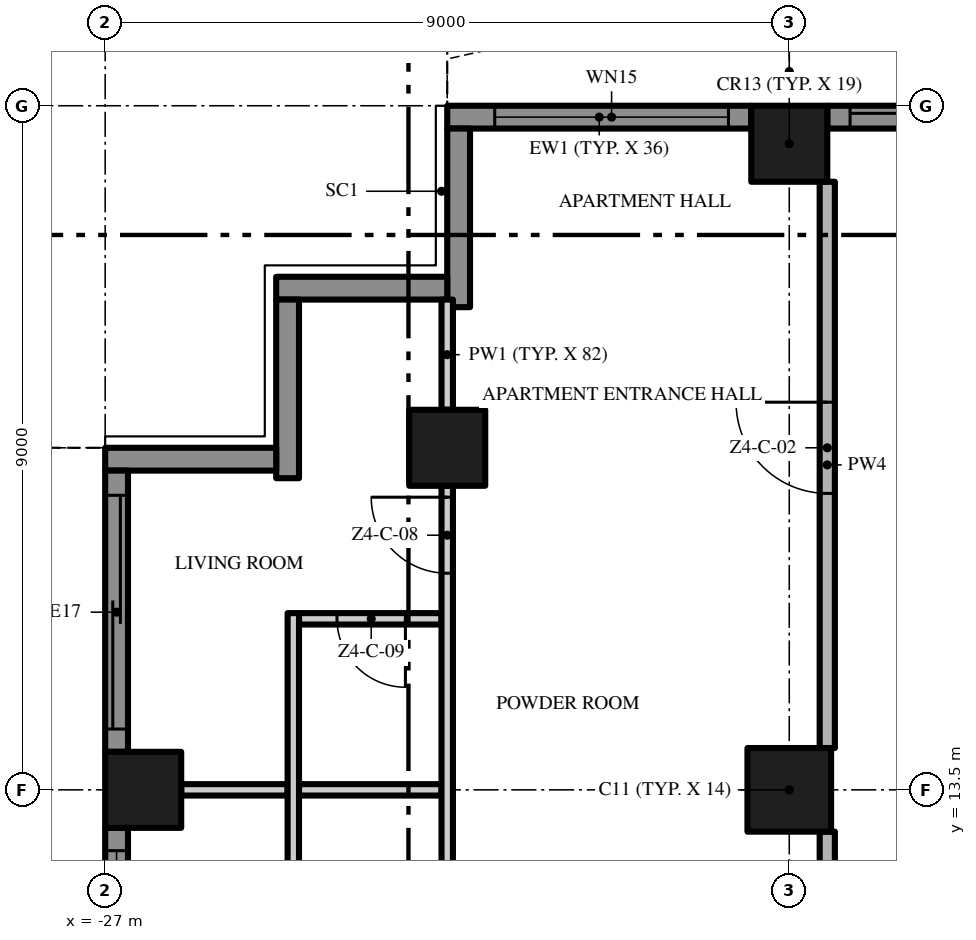
"""IFC4 building model, lengths in metres.
Left out: names, types, materials, properties, quantities, classifications, styles, units other than length and angle.
Written with IfcOpenShell. Run it as: python <this file> out.ifc"""

import sys

from ifc_helpers import new_model, si_unit, direction, frame, frame_2d, origin, origin_2d, place, context, subcontext, project, spatial, polyline, rectangle, outline, extrude, element, fill, save


model = new_model("IFC4")
c1 = context("Model", 3, precision=1e-05, world=origin(), true_north=direction((0.0, 1.0)))
c2 = subcontext(c1, "Body", "Model", "MODEL_VIEW")
j1 = project(units=[si_unit("LENGTHUNIT", "METRE"), si_unit("PLANEANGLEUNIT", "RADIAN")], contexts=[c1])
p1 = place(None, origin())
s1 = spatial("IfcSite", under=j1, at=p1, CompositionType="ELEMENT")
p2 = place(p1, origin())
s2 = spatial("IfcBuilding", under=s1, at=p2, CompositionType="ELEMENT")
p3 = place(p2, frame((0.0, 0.0, 214.8)))
s3 = spatial("IfcBuildingStorey", under=s2, at=p3, CompositionType="ELEMENT", Elevation=214.8)
p4 = place(p3, frame((-18.0, 13.5, 0.0), z_axis=(0.0, 0.0, 1.0), x_axis=(1.0, 0.0, 0.0)))
e1 = element("IfcColumn", 1, at=p4, inside=s3, PredefinedType="COLUMN", context=c2, shape_type="SweptSolid", body=[
    extrude(rectangle(XDim=1.1, YDim=1.1, at=origin_2d()), origin(), (0.0, 0.0, 1.0), 3.5),
])
for number, where, z_axis, x_axis in (
    (2, (-18.0, 22.0, 0.0), (0.0, 0.0, 1.0), (1.0, 0.0, 0.0)),
    (3, (-26.5, 13.5, 0.0), (0.0, 0.0, 1.0), (1.0, 0.0, 0.0)),
    (4, (-22.5, 18.0, 0.0), (0.0, 0.0, 1.0), (1.0, 0.0, 0.0)),
):
    element("IfcColumn", number, at=place(p3, frame(where, z_axis=z_axis, x_axis=x_axis)), inside=s3, PredefinedType="COLUMN", context=c2, shape_type="SweptSolid", body=[
        extrude(rectangle(XDim=1.0, YDim=1.0, at=origin_2d()), origin(), (0.0, 0.0, 1.0), 3.5),
    ])
p5 = place(p3, frame((-17.5, 22.35, 0.0), z_axis=(0.0, 0.0, 1.0), x_axis=(1.0, 0.0, 0.0)))
e5 = element("IfcWall", 5, at=p5, inside=s3, PredefinedType="SOLIDWALL", context=c2, shape_type="SweptSolid", body=[
    extrude(rectangle(XDim=4.0, YDim=0.3, at=frame_2d((2.0, 0.0))), origin(), (0.0, 0.0, 1.0), 3.5),
])
p6 = place(p5, frame((0.3, 0.0, 0.0)))
e6 = element("IfcOpeningElement", 6, at=p6, cuts=e5, PredefinedType="OPENING", context=c2, shape_type="SweptSolid", body=[
    extrude(rectangle(XDim=3.075, YDim=2.4, at=frame_2d((1.538, 1.2))), frame((0.0, 0.16, 0.0), z_axis=(0.0, -1.0, 0.0), x_axis=(1.0, 0.0, 0.0)), (0.0, 0.0, 1.0), 0.32),
])
p7 = place(p3, frame((-22.5, 22.35, 0.0), z_axis=(0.0, 0.0, 1.0), x_axis=(1.0, 0.0, 0.0)))
e7 = element("IfcWall", 7, at=p7, inside=s3, PredefinedType="SOLIDWALL", context=c2, shape_type="SweptSolid", body=[
    extrude(rectangle(XDim=4.0, YDim=0.3, at=frame_2d((2.0, 0.0))), origin(), (0.0, 0.0, 1.0), 3.5),
])
p8 = place(p7, frame((0.625, 0.0, 0.45)))
e8 = element("IfcOpeningElement", 8, at=p8, cuts=e7, PredefinedType="OPENING", context=c2, shape_type="SweptSolid", body=[
    extrude(rectangle(XDim=3.075, YDim=2.65, at=frame_2d((1.538, 1.325))), frame((0.0, 0.16, 0.0), z_axis=(0.0, -1.0, 0.0), x_axis=(1.0, 0.0, 0.0)), (0.0, 0.0, 1.0), 0.32),
])
p9 = place(p3, frame((-22.35, 19.85, 0.0), z_axis=(0.0, 0.0, 1.0), x_axis=(0.0, 1.0, 0.0)))
e9 = element("IfcWall", 9, at=p9, inside=s3, PredefinedType="SOLIDWALL", context=c2, shape_type="SweptSolid", body=[
    extrude(rectangle(XDim=2.35, YDim=0.3, at=frame_2d((1.175, 0.0))), origin(), (0.0, 0.0, 1.0), 3.5),
])
p10 = place(p3, frame((-24.75, 20.1, 0.0), z_axis=(0.0, 0.0, 1.0), x_axis=(1.0, 0.0, 0.0)))
e10 = element("IfcWall", 10, at=p10, inside=s3, PredefinedType="SOLIDWALL", context=c2, shape_type="SweptSolid", body=[
    extrude(rectangle(XDim=2.25, YDim=0.3, at=frame_2d((1.125, 0.0))), origin(), (0.0, 0.0, 1.0), 3.5),
])
p11 = place(p3, frame((-24.6, 17.6, 0.0), z_axis=(0.0, 0.0, 1.0), x_axis=(0.0, 1.0, 0.0)))
e11 = element("IfcWall", 11, at=p11, inside=s3, PredefinedType="SOLIDWALL", context=c2, shape_type="SweptSolid", body=[
    extrude(rectangle(XDim=2.35, YDim=0.3, at=frame_2d((1.175, 0.0))), origin(), (0.0, 0.0, 1.0), 3.5),
])
p12 = place(p3, frame((-27.0, 17.85, 0.0), z_axis=(0.0, 0.0, 1.0), x_axis=(1.0, 0.0, 0.0)))
e12 = element("IfcWall", 12, at=p12, inside=s3, PredefinedType="SOLIDWALL", context=c2, shape_type="SweptSolid", body=[
    extrude(rectangle(XDim=2.25, YDim=0.3, at=frame_2d((1.125, 0.0))), origin(), (0.0, 0.0, 1.0), 3.5),
])
p13 = place(p3, frame((-26.85, 14.0, 0.0), z_axis=(0.0, 0.0, 1.0), x_axis=(0.0, 1.0, 0.0)))
e13 = element("IfcWall", 13, at=p13, inside=s3, PredefinedType="SOLIDWALL", context=c2, shape_type="SweptSolid", body=[
    extrude(rectangle(XDim=3.7, YDim=0.3, at=frame_2d((1.85, 0.0))), origin(), (0.0, 0.0, 1.0), 3.5),
])
p14 = place(p13, frame((0.3, 0.0, 0.0)))
e14 = element("IfcOpeningElement", 14, at=p14, cuts=e13, PredefinedType="OPENING", context=c2, shape_type="SweptSolid", body=[
    extrude(rectangle(XDim=3.075, YDim=2.4, at=frame_2d((1.538, 1.2))), frame((0.0, 0.16, 0.0), z_axis=(0.0, -1.0, 0.0), x_axis=(1.0, 0.0, 0.0)), (0.0, 0.0, 1.0), 0.32),
])
p15 = place(p3, frame((-26.85, 5.0, 0.0), z_axis=(0.0, 0.0, 1.0), x_axis=(0.0, 1.0, 0.0)))
e15 = element("IfcWall", 15, at=p15, inside=s3, PredefinedType="SOLIDWALL", context=c2, shape_type="SweptSolid", body=[
    extrude(rectangle(XDim=8.0, YDim=0.3, at=frame_2d((4.0, 0.0))), origin(), (0.0, 0.0, 1.0), 3.5),
])
p16 = place(p15, frame((4.625, 0.0, 0.45)))
e16 = element("IfcOpeningElement", 16, at=p16, cuts=e15, PredefinedType="OPENING", context=c2, shape_type="SweptSolid", body=[
    extrude(rectangle(XDim=3.075, YDim=2.65, at=frame_2d((1.538, 1.325))), frame((0.0, 0.16, 0.0), z_axis=(0.0, -1.0, 0.0), x_axis=(1.0, 0.0, 0.0)), (0.0, 0.0, 1.0), 0.32),
])
p17 = place(p15, frame((0.3, 0.0, 0.45)))
e17 = element("IfcOpeningElement", 17, at=p17, cuts=e15, PredefinedType="OPENING", context=c2, shape_type="SweptSolid", body=[
    extrude(rectangle(XDim=3.075, YDim=2.65, at=frame_2d((1.538, 1.325))), frame((0.0, 0.16, 0.0), z_axis=(0.0, -1.0, 0.0), x_axis=(1.0, 0.0, 0.0)), (0.0, 0.0, 1.0), 0.32),
])
p18 = place(p3, origin())
e18 = element("IfcWall", 18, at=p18, inside=s3, PredefinedType="USERDEFINED", context=c2, shape_type="SweptSolid", body=[
    extrude(outline(polyline([(-13.5, 25.149), (-15.0, 25.485), (-15.375, 25.5), (-16.5, 25.369), (-18.0, 24.845), (-19.5, 24.112), (-21.0, 23.451), (-22.5, 23.115), (-22.445, 22.871), (-20.921, 23.213), (-19.395, 23.885), (-17.904, 24.614), (-16.444, 25.124), (-15.365, 25.249), (-15.033, 25.236), (-13.555, 24.905), (-13.5, 25.149)])), origin(), (0.0, 0.0, 1.0), 0.9),
])
p19 = place(p3, origin())
e19 = element("IfcWall", 19, at=p19, inside=s3, PredefinedType="USERDEFINED", context=c2, shape_type="SweptSolid", body=[
    extrude(outline(polyline([(-29.649, 18.0), (-29.985, 16.5), (-30.0, 16.125), (-29.869, 15.0), (-29.345, 13.5), (-28.612, 12.0), (-27.951, 10.5), (-27.615, 9.0), (-27.6, 8.625), (-27.731, 7.5), (-28.255, 6.0), (-28.988, 4.5), (-29.649, 3.0), (-29.985, 1.5), (-30.0, 1.125), (-29.869, 0.0), (-29.345, -1.5), (-28.612, -3.0), (-27.951, -4.5), (-27.615, -6.0), (-27.6, -6.375), (-27.731, -7.5), (-28.255, -9.0), (-28.988, -10.5), (-29.649, -12.0), (-29.985, -13.5), (-30.0, -13.875), (-29.869, -15.0), (-29.345, -16.5), (-28.612, -18.0), (-28.388, -17.89), (-29.114, -16.404), (-29.624, -14.944), (-29.749, -13.865), (-29.736, -13.533), (-29.41, -12.079), (-28.761, -10.605), (-28.024, -9.096), (-27.486, -7.556), (-27.349, -6.385), (-27.366, -5.967), (-27.713, -4.421), (-28.385, -2.895), (-29.114, -1.404), (-29.624, 0.056), (-29.749, 1.135), (-29.736, 1.467), (-29.41, 2.921), (-28.761, 4.395), (-28.024, 5.904), (-27.486, 7.444), (-27.349, 8.615), (-27.366, 9.033), (-27.713, 10.579), (-28.385, 12.105), (-29.114, 13.596), (-29.624, 15.056), (-29.749, 16.135), (-29.736, 16.467), (-29.405, 17.945), (-29.649, 18.0)])), origin(), (0.0, 0.0, 1.0), 0.9),
])
p20 = place(p3, frame((-26.0, 13.5, 0.0), z_axis=(0.0, 0.0, 1.0), x_axis=(1.0, 0.0, 0.0)))
e20 = element("IfcWall", 20, at=p20, inside=s3, PredefinedType="PARTITIONING", context=c2, shape_type="SweptSolid", body=[
    extrude(rectangle(XDim=1.4, YDim=0.15, at=frame_2d((0.7, 0.0))), origin(), (0.0, 0.0, 1.0), 3.5),
])
p21 = place(p3, frame((-24.45, 13.5, 0.0), z_axis=(0.0, 0.0, 1.0), x_axis=(1.0, 0.0, 0.0)))
e21 = element("IfcWall", 21, at=p21, inside=s3, PredefinedType="PARTITIONING", context=c2, shape_type="SweptSolid", body=[
    extrude(rectangle(XDim=1.875, YDim=0.15, at=frame_2d((0.938, 0.0))), origin(), (0.0, 0.0, 1.0), 3.5),
])
p22 = place(p3, frame((-22.575, 15.75, 0.0), z_axis=(0.0, 0.0, 1.0), x_axis=(-1.0, 0.0, 0.0)))
e22 = element("IfcWall", 22, at=p22, inside=s3, PredefinedType="PARTITIONING", context=c2, shape_type="SweptSolid", body=[
    extrude(rectangle(XDim=1.875, YDim=0.15, at=frame_2d((0.938, 0.0))), origin(), (0.0, 0.0, 1.0), 3.5),
])
p23 = place(p22, frame((0.475, 0.0, 0.0)))
e23 = element("IfcOpeningElement", 23, at=p23, cuts=e22, PredefinedType="OPENING", context=c2, shape_type="SweptSolid", body=[
    extrude(rectangle(XDim=0.9, YDim=2.1, at=frame_2d((0.45, 1.05))), frame((0.0, 0.085, 0.0), z_axis=(0.0, -1.0, 0.0), x_axis=(1.0, 0.0, 0.0)), (0.0, 0.0, 1.0), 0.17),
])
p24 = place(p3, frame((-24.525, 11.175, 0.0), z_axis=(0.0, 0.0, 1.0), x_axis=(0.0, 1.0, 0.0)))
e24 = element("IfcWall", 24, at=p24, inside=s3, PredefinedType="PARTITIONING", context=c2, shape_type="SweptSolid", body=[
    extrude(rectangle(XDim=4.65, YDim=0.15, at=frame_2d((2.325, 0.0))), origin(), (0.0, 0.0, 1.0), 3.5),
])
p25 = place(p3, frame((-22.5, 0.1, 0.0), z_axis=(0.0, 0.0, 1.0), x_axis=(0.0, 1.0, 0.0)))
e25 = element("IfcWall", 25, at=p25, inside=s3, PredefinedType="PARTITIONING", context=c2, shape_type="SweptSolid", body=[
    extrude(rectangle(XDim=17.4, YDim=0.15, at=frame_2d((8.7, 0.0))), origin(), (0.0, 0.0, 1.0), 3.5),
])
p26 = place(p25, frame((1.65, 0.0, 0.0)))
e26 = element("IfcOpeningElement", 26, at=p26, cuts=e25, PredefinedType="OPENING", context=c2, shape_type="SweptSolid", body=[
    extrude(rectangle(XDim=1.0, YDim=2.4, at=frame_2d((0.5, 1.2))), frame((0.0, 0.085, 0.0), z_axis=(0.0, -1.0, 0.0), x_axis=(1.0, 0.0, 0.0)), (0.0, 0.0, 1.0), 0.17),
])
p27 = place(p25, frame((7.25, 0.0, 0.0)))
e27 = element("IfcOpeningElement", 27, at=p27, cuts=e25, PredefinedType="OPENING", context=c2, shape_type="SweptSolid", body=[
    extrude(rectangle(XDim=1.0, YDim=2.4, at=frame_2d((0.5, 1.2))), frame((0.0, 0.085, 0.0), z_axis=(0.0, -1.0, 0.0), x_axis=(1.0, 0.0, 0.0)), (0.0, 0.0, 1.0), 0.17),
])
p28 = place(p25, frame((9.5, 0.0, 0.0)))
e28 = element("IfcOpeningElement", 28, at=p28, cuts=e25, PredefinedType="OPENING", context=c2, shape_type="SweptSolid", body=[
    extrude(rectangle(XDim=1.0, YDim=2.4, at=frame_2d((0.5, 1.2))), frame((0.0, 0.085, 0.0), z_axis=(0.0, -1.0, 0.0), x_axis=(1.0, 0.0, 0.0)), (0.0, 0.0, 1.0), 0.17),
])
p29 = place(p25, frame((16.25, 0.0, 0.0)))
e29 = element("IfcOpeningElement", 29, at=p29, cuts=e25, PredefinedType="OPENING", context=c2, shape_type="SweptSolid", body=[
    extrude(rectangle(XDim=1.0, YDim=2.4, at=frame_2d((0.5, 1.2))), frame((0.0, 0.085, 0.0), z_axis=(0.0, -1.0, 0.0), x_axis=(1.0, 0.0, 0.0)), (0.0, 0.0, 1.0), 0.17),
])
p30 = place(p3, frame((-22.5, 18.5, 0.0), z_axis=(0.0, 0.0, 1.0), x_axis=(0.0, 1.0, 0.0)))
e30 = element("IfcWall", 30, at=p30, inside=s3, PredefinedType="PARTITIONING", context=c2, shape_type="SweptSolid", body=[
    extrude(rectangle(XDim=1.45, YDim=0.15, at=frame_2d((0.725, 0.0))), origin(), (0.0, 0.0, 1.0), 3.5),
])
p31 = place(p3, frame((-17.5, 5.05, 0.0), z_axis=(0.0, 0.0, 1.0), x_axis=(0.0, 1.0, 0.0)))
e31 = element("IfcWall", 31, at=p31, inside=s3, PredefinedType="PARTITIONING", context=c2, shape_type="SweptSolid", body=[
    extrude(rectangle(XDim=7.9, YDim=0.2, at=frame_2d((3.95, 0.0))), origin(), (0.0, 0.0, 1.0), 3.5),
])
p32 = place(p3, frame((-17.5, 14.05, 0.0), z_axis=(0.0, 0.0, 1.0), x_axis=(0.0, 1.0, 0.0)))
e32 = element("IfcWall", 32, at=p32, inside=s3, PredefinedType="PARTITIONING", context=c2, shape_type="SweptSolid", body=[
    extrude(rectangle(XDim=7.45, YDim=0.2, at=frame_2d((3.725, 0.0))), origin(), (0.0, 0.0, 1.0), 3.5),
])
p33 = place(p32, frame((3.35, 0.0, 0.0)))
e33 = element("IfcOpeningElement", 33, at=p33, cuts=e32, PredefinedType="OPENING", context=c2, shape_type="SweptSolid", body=[
    extrude(rectangle(XDim=1.2, YDim=2.4, at=frame_2d((0.6, 1.2))), frame((0.0, 0.11, 0.0), z_axis=(0.0, -1.0, 0.0), x_axis=(1.0, 0.0, 0.0)), (0.0, 0.0, 1.0), 0.22),
])
p34 = place(p6, origin())
e34 = element("IfcDoor", 34, at=p34, inside=s3, OperationType="SINGLE_SWING_LEFT", PredefinedType="DOOR", context=c2, shape_type="SweptSolid", body=[
    extrude(rectangle(XDim=3.075, YDim=2.4, at=frame_2d((1.538, 1.2))), frame((0.0, 0.025, 0.0), z_axis=(0.0, -1.0, 0.0), x_axis=(1.0, 0.0, 0.0)), (0.0, 0.0, 1.0), 0.05),
])
fill(e6, e34)
p35 = place(p8, origin())
e35 = element("IfcWindow", 35, at=p35, inside=s3, PartitioningType="SINGLE_PANEL", PredefinedType="WINDOW", context=c2, shape_type="SweptSolid", body=[
    extrude(rectangle(XDim=3.075, YDim=2.65, at=frame_2d((1.538, 1.325))), frame((0.0, 0.03, 0.0), z_axis=(0.0, -1.0, 0.0), x_axis=(1.0, 0.0, 0.0)), (0.0, 0.0, 1.0), 0.06),
])
fill(e8, e35)
p36 = place(p14, origin())
e36 = element("IfcDoor", 36, at=p36, inside=s3, OperationType="SINGLE_SWING_LEFT", PredefinedType="DOOR", context=c2, shape_type="SweptSolid", body=[
    extrude(rectangle(XDim=3.075, YDim=2.4, at=frame_2d((1.538, 1.2))), frame((0.0, 0.025, 0.0), z_axis=(0.0, -1.0, 0.0), x_axis=(1.0, 0.0, 0.0)), (0.0, 0.0, 1.0), 0.05),
])
fill(e14, e36)
p37 = place(p16, origin())
e37 = element("IfcWindow", 37, at=p37, inside=s3, PartitioningType="SINGLE_PANEL", PredefinedType="WINDOW", context=c2, shape_type="SweptSolid", body=[
    extrude(rectangle(XDim=3.075, YDim=2.65, at=frame_2d((1.538, 1.325))), frame((0.0, 0.03, 0.0), z_axis=(0.0, -1.0, 0.0), x_axis=(1.0, 0.0, 0.0)), (0.0, 0.0, 1.0), 0.06),
])
fill(e16, e37)
p38 = place(p33, origin())
e38 = element("IfcDoor", 38, at=p38, inside=s3, OperationType="SINGLE_SWING_RIGHT", PredefinedType="DOOR", context=c2, shape_type="SweptSolid", body=[
    extrude(rectangle(XDim=1.2, YDim=2.4, at=frame_2d((0.6, 1.2))), frame((0.0, 0.025, 0.0), z_axis=(0.0, -1.0, 0.0), x_axis=(1.0, 0.0, 0.0)), (0.0, 0.0, 1.0), 0.05),
])
fill(e33, e38)
p39 = place(p29, origin())
e39 = element("IfcDoor", 39, at=p39, inside=s3, OperationType="SINGLE_SWING_RIGHT", PredefinedType="DOOR", context=c2, shape_type="SweptSolid", body=[
    extrude(rectangle(XDim=1.0, YDim=2.4, at=frame_2d((0.5, 1.2))), frame((0.0, 0.025, 0.0), z_axis=(0.0, -1.0, 0.0), x_axis=(1.0, 0.0, 0.0)), (0.0, 0.0, 1.0), 0.05),
])
fill(e29, e39)
p40 = place(p23, origin())
e40 = element("IfcDoor", 40, at=p40, inside=s3, OperationType="SINGLE_SWING_LEFT", PredefinedType="DOOR", context=c2, shape_type="SweptSolid", body=[
    extrude(rectangle(XDim=0.9, YDim=2.1, at=frame_2d((0.45, 1.05))), frame((0.0, 0.025, 0.0), z_axis=(0.0, -1.0, 0.0), x_axis=(1.0, 0.0, 0.0)), (0.0, 0.0, 1.0), 0.05),
])
fill(e23, e40)
save(model, sys.argv[1])
